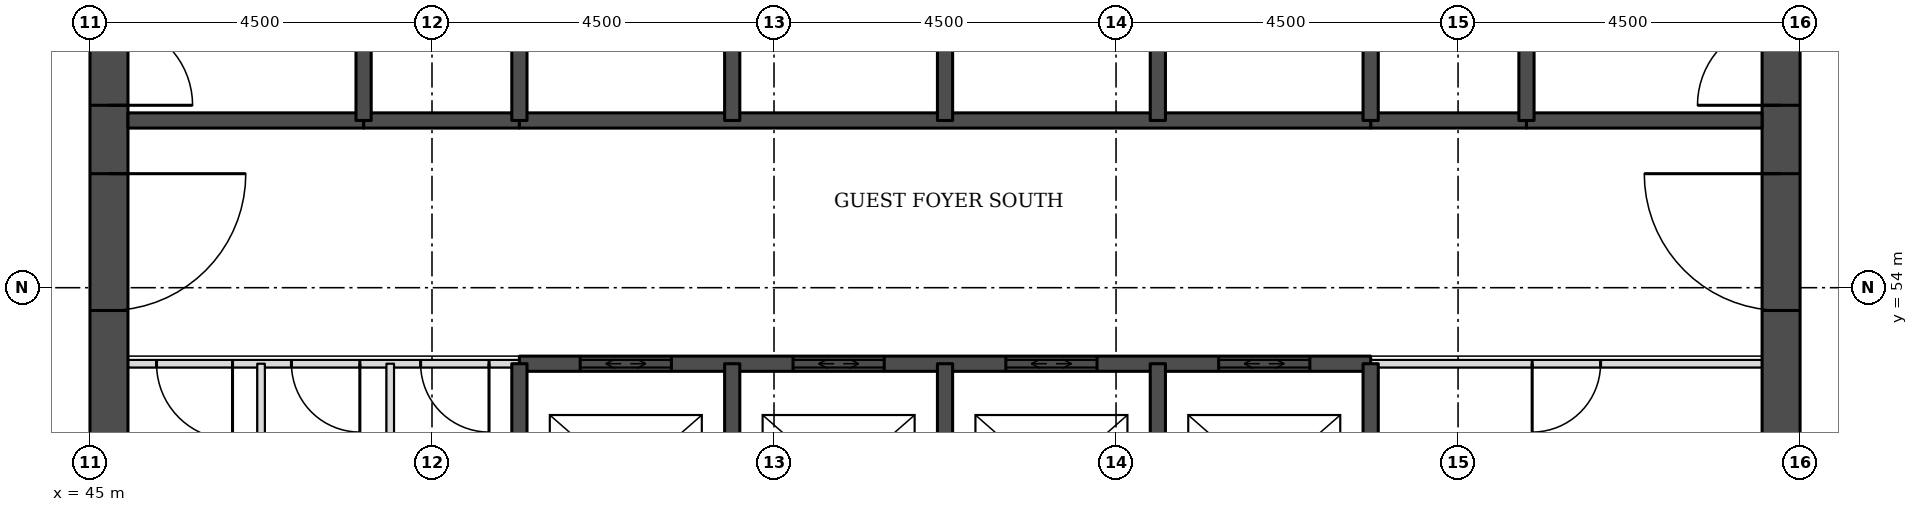
"""IFC4 building model, lengths in metres.
Left out: names, types, materials, properties, quantities, classifications, styles, units other than length and angle.
Written with IfcOpenShell. Run it as: python <this file> out.ifc"""

import sys

from ifc_helpers import new_model, si_unit, direction, frame, frame_2d, origin, place, context, subcontext, project, spatial, rectangle, extrude, element, fill, save


model = new_model("IFC4")
c1 = context("Model", 3, precision=1e-05, world=origin(), true_north=direction((0.0, 1.0)))
c2 = subcontext(c1, "Body", "Model", "MODEL_VIEW")
j1 = project(units=[si_unit("LENGTHUNIT", "METRE"), si_unit("PLANEANGLEUNIT", "RADIAN")], contexts=[c1])
p1 = place(None, origin())
s1 = spatial("IfcSite", under=j1, at=p1, CompositionType="ELEMENT")
p2 = place(p1, origin())
s2 = spatial("IfcBuilding", under=s1, at=p2, CompositionType="ELEMENT")
p3 = place(p2, frame((0.0, 0.0, 39.6)))
s3 = spatial("IfcBuildingStorey", under=s2, at=p3, CompositionType="ELEMENT", Elevation=39.6)
p4 = place(p3, frame((45.25, 49.5, 0.0), z_axis=(0.0, 0.0, 1.0), x_axis=(0.0, 1.0, 0.0)))
e1 = element("IfcWall", 1, at=p4, inside=s3, PredefinedType="SHEAR", context=c2, shape_type="SweptSolid", body=[
    extrude(rectangle(XDim=22.5, YDim=0.5, at=frame_2d((11.25, 0.0))), origin(), (0.0, 0.0, 1.0), 3.3),
])
p5 = place(p4, frame((4.2, 0.0, 0.0)))
e2 = element("IfcOpeningElement", 2, at=p5, cuts=e1, PredefinedType="OPENING", context=c2, shape_type="SweptSolid", body=[
    extrude(rectangle(XDim=1.8, YDim=2.1, at=frame_2d((0.9, 1.05))), frame((0.0, 0.26, 0.0), z_axis=(0.0, -1.0, 0.0), x_axis=(1.0, 0.0, 0.0)), (0.0, 0.0, 1.0), 0.52),
])
p6 = place(p4, frame((6.9, 0.0, 0.0)))
e3 = element("IfcOpeningElement", 3, at=p6, cuts=e1, PredefinedType="OPENING", context=c2, shape_type="SweptSolid", body=[
    extrude(rectangle(XDim=1.1, YDim=2.1, at=frame_2d((0.55, 1.05))), frame((0.0, 0.26, 0.0), z_axis=(0.0, -1.0, 0.0), x_axis=(1.0, 0.0, 0.0)), (0.0, 0.0, 1.0), 0.52),
])
p7 = place(p4, frame((13.6, 0.0, 0.0)))
e4 = element("IfcOpeningElement", 4, at=p7, cuts=e1, PredefinedType="OPENING", context=c2, shape_type="SweptSolid", body=[
    extrude(rectangle(XDim=1.1, YDim=2.1, at=frame_2d((0.55, 1.05))), frame((0.0, 0.26, 0.0), z_axis=(0.0, -1.0, 0.0), x_axis=(1.0, 0.0, 0.0)), (0.0, 0.0, 1.0), 0.52),
])
p8 = place(p4, frame((16.5, 0.0, 0.0)))
e5 = element("IfcOpeningElement", 5, at=p8, cuts=e1, PredefinedType="OPENING", context=c2, shape_type="SweptSolid", body=[
    extrude(rectangle(XDim=1.8, YDim=2.1, at=frame_2d((0.9, 1.05))), frame((0.0, 0.26, 0.0), z_axis=(0.0, -1.0, 0.0), x_axis=(1.0, 0.0, 0.0)), (0.0, 0.0, 1.0), 0.52),
])
p9 = place(p3, frame((67.25, 49.5, 0.0), z_axis=(0.0, 0.0, 1.0), x_axis=(0.0, 1.0, 0.0)))
e6 = element("IfcWall", 6, at=p9, inside=s3, PredefinedType="SHEAR", context=c2, shape_type="SweptSolid", body=[
    extrude(rectangle(XDim=22.5, YDim=0.5, at=frame_2d((11.25, 0.0))), origin(), (0.0, 0.0, 1.0), 3.3),
])
p10 = place(p9, frame((4.2, 0.0, 0.0)))
e7 = element("IfcOpeningElement", 7, at=p10, cuts=e6, PredefinedType="OPENING", context=c2, shape_type="SweptSolid", body=[
    extrude(rectangle(XDim=1.8, YDim=2.1, at=frame_2d((0.9, 1.05))), frame((0.0, 0.26, 0.0), z_axis=(0.0, -1.0, 0.0), x_axis=(1.0, 0.0, 0.0)), (0.0, 0.0, 1.0), 0.52),
])
p11 = place(p9, frame((6.9, 0.0, 0.0)))
e8 = element("IfcOpeningElement", 8, at=p11, cuts=e6, PredefinedType="OPENING", context=c2, shape_type="SweptSolid", body=[
    extrude(rectangle(XDim=1.1, YDim=2.1, at=frame_2d((0.55, 1.05))), frame((0.0, 0.26, 0.0), z_axis=(0.0, -1.0, 0.0), x_axis=(1.0, 0.0, 0.0)), (0.0, 0.0, 1.0), 0.52),
])
p12 = place(p9, frame((13.6, 0.0, 0.0)))
e9 = element("IfcOpeningElement", 9, at=p12, cuts=e6, PredefinedType="OPENING", context=c2, shape_type="SweptSolid", body=[
    extrude(rectangle(XDim=1.1, YDim=2.1, at=frame_2d((0.55, 1.05))), frame((0.0, 0.26, 0.0), z_axis=(0.0, -1.0, 0.0), x_axis=(1.0, 0.0, 0.0)), (0.0, 0.0, 1.0), 0.52),
])
p13 = place(p9, frame((16.5, 0.0, 0.0)))
e10 = element("IfcOpeningElement", 10, at=p13, cuts=e6, PredefinedType="OPENING", context=c2, shape_type="SweptSolid", body=[
    extrude(rectangle(XDim=1.8, YDim=2.1, at=frame_2d((0.9, 1.05))), frame((0.0, 0.26, 0.0), z_axis=(0.0, -1.0, 0.0), x_axis=(1.0, 0.0, 0.0)), (0.0, 0.0, 1.0), 0.52),
])
p14 = place(p3, frame((45.5, 53.0, 0.0), z_axis=(0.0, 0.0, 1.0), x_axis=(1.0, 0.0, 0.0)))
e11 = element("IfcWall", 11, at=p14, inside=s3, PredefinedType="PARTITIONING", context=c2, shape_type="SweptSolid", body=[
    extrude(rectangle(XDim=5.15, YDim=0.1, at=frame_2d((2.575, 0.0))), origin(), (0.0, 0.0, 1.0), 3.08),
])
p15 = place(p14, frame((0.375, 0.0, 0.0)))
e12 = element("IfcOpeningElement", 12, at=p15, cuts=e11, PredefinedType="OPENING", context=c2, shape_type="SweptSolid", body=[
    extrude(rectangle(XDim=1.0, YDim=2.1, at=frame_2d((0.5, 1.05))), frame((0.0, 0.06, 0.0), z_axis=(0.0, -1.0, 0.0), x_axis=(1.0, 0.0, 0.0)), (0.0, 0.0, 1.0), 0.12),
])
p16 = place(p14, frame((2.151, 0.0, 0.0)))
e13 = element("IfcOpeningElement", 13, at=p16, cuts=e11, PredefinedType="OPENING", context=c2, shape_type="SweptSolid", body=[
    extrude(rectangle(XDim=0.9, YDim=2.1, at=frame_2d((0.45, 1.05))), frame((0.0, 0.06, 0.0), z_axis=(0.0, -1.0, 0.0), x_axis=(1.0, 0.0, 0.0)), (0.0, 0.0, 1.0), 0.12),
])
p17 = place(p14, frame((3.85, 0.0, 0.0)))
e14 = element("IfcOpeningElement", 14, at=p17, cuts=e11, PredefinedType="OPENING", context=c2, shape_type="SweptSolid", body=[
    extrude(rectangle(XDim=0.9, YDim=2.1, at=frame_2d((0.45, 1.05))), frame((0.0, 0.06, 0.0), z_axis=(0.0, -1.0, 0.0), x_axis=(1.0, 0.0, 0.0)), (0.0, 0.0, 1.0), 0.12),
])
p18 = place(p3, frame((61.85, 53.0, 0.0), z_axis=(0.0, 0.0, 1.0), x_axis=(1.0, 0.0, 0.0)))
e15 = element("IfcWall", 15, at=p18, inside=s3, PredefinedType="PARTITIONING", context=c2, shape_type="SweptSolid", body=[
    extrude(rectangle(XDim=5.15, YDim=0.1, at=frame_2d((2.575, 0.0))), origin(), (0.0, 0.0, 1.0), 3.08),
])
p19 = place(p18, frame((2.125, 0.0, 0.0)))
e16 = element("IfcOpeningElement", 16, at=p19, cuts=e15, PredefinedType="OPENING", context=c2, shape_type="SweptSolid", body=[
    extrude(rectangle(XDim=0.9, YDim=2.1, at=frame_2d((0.45, 1.05))), frame((0.0, 0.06, 0.0), z_axis=(0.0, -1.0, 0.0), x_axis=(1.0, 0.0, 0.0)), (0.0, 0.0, 1.0), 0.12),
])
p20 = place(p3, frame((50.65, 53.0, 0.0), z_axis=(0.0, 0.0, 1.0), x_axis=(1.0, 0.0, 0.0)))
e17 = element("IfcWall", 17, at=p20, inside=s3, PredefinedType="SOLIDWALL", context=c2, shape_type="SweptSolid", body=[
    extrude(rectangle(XDim=11.2, YDim=0.2, at=frame_2d((5.6, 0.0))), origin(), (0.0, 0.0, 1.0), 3.08),
])
p21 = place(p20, frame((0.8, 0.0, 0.0)))
e18 = element("IfcOpeningElement", 18, at=p21, cuts=e17, PredefinedType="OPENING", context=c2, shape_type="SweptSolid", body=[
    extrude(rectangle(XDim=1.2, YDim=2.1, at=frame_2d((0.6, 1.05))), frame((0.0, 0.11, 0.0), z_axis=(0.0, -1.0, 0.0), x_axis=(1.0, 0.0, 0.0)), (0.0, 0.0, 1.0), 0.22),
])
p22 = place(p20, frame((3.6, 0.0, 0.0)))
e19 = element("IfcOpeningElement", 19, at=p22, cuts=e17, PredefinedType="OPENING", context=c2, shape_type="SweptSolid", body=[
    extrude(rectangle(XDim=1.2, YDim=2.1, at=frame_2d((0.6, 1.05))), frame((0.0, 0.11, 0.0), z_axis=(0.0, -1.0, 0.0), x_axis=(1.0, 0.0, 0.0)), (0.0, 0.0, 1.0), 0.22),
])
p23 = place(p20, frame((6.4, 0.0, 0.0)))
e20 = element("IfcOpeningElement", 20, at=p23, cuts=e17, PredefinedType="OPENING", context=c2, shape_type="SweptSolid", body=[
    extrude(rectangle(XDim=1.2, YDim=2.1, at=frame_2d((0.6, 1.05))), frame((0.0, 0.11, 0.0), z_axis=(0.0, -1.0, 0.0), x_axis=(1.0, 0.0, 0.0)), (0.0, 0.0, 1.0), 0.22),
])
p24 = place(p20, frame((9.2, 0.0, 0.0)))
e21 = element("IfcOpeningElement", 21, at=p24, cuts=e17, PredefinedType="OPENING", context=c2, shape_type="SweptSolid", body=[
    extrude(rectangle(XDim=1.2, YDim=2.1, at=frame_2d((0.6, 1.05))), frame((0.0, 0.11, 0.0), z_axis=(0.0, -1.0, 0.0), x_axis=(1.0, 0.0, 0.0)), (0.0, 0.0, 1.0), 0.22),
])
for number, where, z_axis, x_axis in (
    (22, (48.6, 56.2, 0.0), (0.0, 0.0, 1.0), (1.0, 0.0, 0.0)),
    (23, (61.85, 56.2, 0.0), (0.0, 0.0, 1.0), (1.0, 0.0, 0.0)),
):
    element("IfcWall", number, at=place(p3, frame(where, z_axis=z_axis, x_axis=x_axis)), inside=s3, PredefinedType="SOLIDWALL", context=c2, shape_type="SweptSolid", body=[
        extrude(rectangle(XDim=2.05, YDim=0.2, at=frame_2d((1.025, 0.0))), origin(), (0.0, 0.0, 1.0), 3.08),
    ])
p25 = place(p3, frame((45.5, 56.2, 0.0), z_axis=(0.0, 0.0, 1.0), x_axis=(1.0, 0.0, 0.0)))
e24 = element("IfcWall", 24, at=p25, inside=s3, PredefinedType="SOLIDWALL", context=c2, shape_type="SweptSolid", body=[
    extrude(rectangle(XDim=3.1, YDim=0.2, at=frame_2d((1.55, 0.0))), origin(), (0.0, 0.0, 1.0), 3.08),
])
p26 = place(p3, frame((50.65, 56.2, 0.0), z_axis=(0.0, 0.0, 1.0), x_axis=(1.0, 0.0, 0.0)))
e25 = element("IfcWall", 25, at=p26, inside=s3, PredefinedType="SOLIDWALL", context=c2, shape_type="SweptSolid", body=[
    extrude(rectangle(XDim=11.2, YDim=0.2, at=frame_2d((5.6, 0.0))), origin(), (0.0, 0.0, 1.0), 3.08),
])
p27 = place(p3, frame((63.9, 56.2, 0.0), z_axis=(0.0, 0.0, 1.0), x_axis=(1.0, 0.0, 0.0)))
e26 = element("IfcWall", 26, at=p27, inside=s3, PredefinedType="SOLIDWALL", context=c2, shape_type="SweptSolid", body=[
    extrude(rectangle(XDim=3.1, YDim=0.2, at=frame_2d((1.55, 0.0))), origin(), (0.0, 0.0, 1.0), 3.08),
])
p28 = place(p3, frame((47.251, 50.0, 0.0), z_axis=(0.0, 0.0, 1.0), x_axis=(0.0, 1.0, 0.0)))
e27 = element("IfcWall", 27, at=p28, inside=s3, PredefinedType="PARTITIONING", context=c2, shape_type="SweptSolid", body=[
    extrude(rectangle(XDim=3.0, YDim=0.1, at=frame_2d((1.5, 0.0))), origin(), (0.0, 0.0, 1.0), 3.08),
])
p29 = place(p3, frame((48.6, 56.2, 0.0), z_axis=(0.0, 0.0, 1.0), x_axis=(0.0, 1.0, 0.0)))
e28 = element("IfcWall", 28, at=p29, inside=s3, PredefinedType="SOLIDWALL", context=c2, shape_type="SweptSolid", body=[
    extrude(rectangle(XDim=5.8, YDim=0.2, at=frame_2d((2.9, 0.0))), origin(), (0.0, 0.0, 1.0), 3.08),
])
p30 = place(p3, frame((48.95, 50.0, 0.0), z_axis=(0.0, 0.0, 1.0), x_axis=(0.0, 1.0, 0.0)))
e29 = element("IfcWall", 29, at=p30, inside=s3, PredefinedType="PARTITIONING", context=c2, shape_type="SweptSolid", body=[
    extrude(rectangle(XDim=3.0, YDim=0.1, at=frame_2d((1.5, 0.0))), origin(), (0.0, 0.0, 1.0), 3.08),
])
p31 = place(p3, frame((50.65, 50.0, 0.0), z_axis=(0.0, 0.0, 1.0), x_axis=(0.0, 1.0, 0.0)))
e30 = element("IfcWall", 30, at=p31, inside=s3, PredefinedType="SOLIDWALL", context=c2, shape_type="SweptSolid", body=[
    extrude(rectangle(XDim=3.0, YDim=0.2, at=frame_2d((1.5, 0.0))), origin(), (0.0, 0.0, 1.0), 3.08),
])
p32 = place(p3, frame((50.65, 56.2, 0.0), z_axis=(0.0, 0.0, 1.0), x_axis=(0.0, 1.0, 0.0)))
e31 = element("IfcWall", 31, at=p32, inside=s3, PredefinedType="SOLIDWALL", context=c2, shape_type="SweptSolid", body=[
    extrude(rectangle(XDim=2.8, YDim=0.2, at=frame_2d((1.4, 0.0))), origin(), (0.0, 0.0, 1.0), 3.08),
])
p33 = place(p3, frame((53.45, 50.0, 0.0), z_axis=(0.0, 0.0, 1.0), x_axis=(0.0, 1.0, 0.0)))
e32 = element("IfcWall", 32, at=p33, inside=s3, PredefinedType="SOLIDWALL", context=c2, shape_type="SweptSolid", body=[
    extrude(rectangle(XDim=3.0, YDim=0.2, at=frame_2d((1.5, 0.0))), origin(), (0.0, 0.0, 1.0), 3.08),
])
p34 = place(p3, frame((53.45, 56.2, 0.0), z_axis=(0.0, 0.0, 1.0), x_axis=(0.0, 1.0, 0.0)))
e33 = element("IfcWall", 33, at=p34, inside=s3, PredefinedType="SOLIDWALL", context=c2, shape_type="SweptSolid", body=[
    extrude(rectangle(XDim=2.8, YDim=0.2, at=frame_2d((1.4, 0.0))), origin(), (0.0, 0.0, 1.0), 3.08),
])
p35 = place(p3, frame((56.25, 50.0, 0.0), z_axis=(0.0, 0.0, 1.0), x_axis=(0.0, 1.0, 0.0)))
e34 = element("IfcWall", 34, at=p35, inside=s3, PredefinedType="SOLIDWALL", context=c2, shape_type="SweptSolid", body=[
    extrude(rectangle(XDim=3.0, YDim=0.2, at=frame_2d((1.5, 0.0))), origin(), (0.0, 0.0, 1.0), 3.08),
])
p36 = place(p3, frame((56.25, 56.2, 0.0), z_axis=(0.0, 0.0, 1.0), x_axis=(0.0, 1.0, 0.0)))
e35 = element("IfcWall", 35, at=p36, inside=s3, PredefinedType="SOLIDWALL", context=c2, shape_type="SweptSolid", body=[
    extrude(rectangle(XDim=2.8, YDim=0.2, at=frame_2d((1.4, 0.0))), origin(), (0.0, 0.0, 1.0), 3.08),
])
p37 = place(p3, frame((59.05, 50.0, 0.0), z_axis=(0.0, 0.0, 1.0), x_axis=(0.0, 1.0, 0.0)))
e36 = element("IfcWall", 36, at=p37, inside=s3, PredefinedType="SOLIDWALL", context=c2, shape_type="SweptSolid", body=[
    extrude(rectangle(XDim=3.0, YDim=0.2, at=frame_2d((1.5, 0.0))), origin(), (0.0, 0.0, 1.0), 3.08),
])
p38 = place(p3, frame((59.05, 56.2, 0.0), z_axis=(0.0, 0.0, 1.0), x_axis=(0.0, 1.0, 0.0)))
e37 = element("IfcWall", 37, at=p38, inside=s3, PredefinedType="SOLIDWALL", context=c2, shape_type="SweptSolid", body=[
    extrude(rectangle(XDim=2.8, YDim=0.2, at=frame_2d((1.4, 0.0))), origin(), (0.0, 0.0, 1.0), 3.08),
])
p39 = place(p3, frame((61.85, 50.0, 0.0), z_axis=(0.0, 0.0, 1.0), x_axis=(0.0, 1.0, 0.0)))
e38 = element("IfcWall", 38, at=p39, inside=s3, PredefinedType="SOLIDWALL", context=c2, shape_type="SweptSolid", body=[
    extrude(rectangle(XDim=3.0, YDim=0.2, at=frame_2d((1.5, 0.0))), origin(), (0.0, 0.0, 1.0), 3.08),
])
p40 = place(p3, frame((61.85, 56.2, 0.0), z_axis=(0.0, 0.0, 1.0), x_axis=(0.0, 1.0, 0.0)))
e39 = element("IfcWall", 39, at=p40, inside=s3, PredefinedType="SOLIDWALL", context=c2, shape_type="SweptSolid", body=[
    extrude(rectangle(XDim=2.8, YDim=0.2, at=frame_2d((1.4, 0.0))), origin(), (0.0, 0.0, 1.0), 3.08),
])
p41 = place(p3, frame((63.9, 56.2, 0.0), z_axis=(0.0, 0.0, 1.0), x_axis=(0.0, 1.0, 0.0)))
e40 = element("IfcWall", 40, at=p41, inside=s3, PredefinedType="SOLIDWALL", context=c2, shape_type="SweptSolid", body=[
    extrude(rectangle(XDim=5.8, YDim=0.2, at=frame_2d((2.9, 0.0))), origin(), (0.0, 0.0, 1.0), 3.08),
])
p42 = place(p21, origin())
e41 = element("IfcDoor", 41, at=p42, inside=s3, OperationType="DOUBLE_DOOR_SLIDING", PredefinedType="DOOR", context=c2, shape_type="SweptSolid", body=[
    extrude(rectangle(XDim=1.2, YDim=2.1, at=frame_2d((0.6, 1.05))), frame((0.0, 0.025, 0.0), z_axis=(0.0, -1.0, 0.0), x_axis=(1.0, 0.0, 0.0)), (0.0, 0.0, 1.0), 0.05),
])
fill(e18, e41)
p43 = place(p22, origin())
e42 = element("IfcDoor", 42, at=p43, inside=s3, OperationType="DOUBLE_DOOR_SLIDING", PredefinedType="DOOR", context=c2, shape_type="SweptSolid", body=[
    extrude(rectangle(XDim=1.2, YDim=2.1, at=frame_2d((0.6, 1.05))), frame((0.0, 0.025, 0.0), z_axis=(0.0, -1.0, 0.0), x_axis=(1.0, 0.0, 0.0)), (0.0, 0.0, 1.0), 0.05),
])
fill(e19, e42)
p44 = place(p23, origin())
e43 = element("IfcDoor", 43, at=p44, inside=s3, OperationType="DOUBLE_DOOR_SLIDING", PredefinedType="DOOR", context=c2, shape_type="SweptSolid", body=[
    extrude(rectangle(XDim=1.2, YDim=2.1, at=frame_2d((0.6, 1.05))), frame((0.0, 0.025, 0.0), z_axis=(0.0, -1.0, 0.0), x_axis=(1.0, 0.0, 0.0)), (0.0, 0.0, 1.0), 0.05),
])
fill(e20, e43)
p45 = place(p24, origin())
e44 = element("IfcDoor", 44, at=p45, inside=s3, OperationType="DOUBLE_DOOR_SLIDING", PredefinedType="DOOR", context=c2, shape_type="SweptSolid", body=[
    extrude(rectangle(XDim=1.2, YDim=2.1, at=frame_2d((0.6, 1.05))), frame((0.0, 0.025, 0.0), z_axis=(0.0, -1.0, 0.0), x_axis=(1.0, 0.0, 0.0)), (0.0, 0.0, 1.0), 0.05),
])
fill(e21, e44)
p46 = place(p5, frame((1.8, 0.0, 0.0), z_axis=(0.0, 0.0, 1.0), x_axis=(-1.0, 0.0, 0.0)))
e45 = element("IfcDoor", 45, at=p46, inside=s3, OperationType="SINGLE_SWING_LEFT", PredefinedType="DOOR", context=c2, shape_type="SweptSolid", body=[
    extrude(rectangle(XDim=1.8, YDim=2.1, at=frame_2d((0.9, 1.05))), frame((0.0, 0.025, 0.0), z_axis=(0.0, -1.0, 0.0), x_axis=(1.0, 0.0, 0.0)), (0.0, 0.0, 1.0), 0.05),
])
fill(e2, e45)
p47 = place(p6, frame((1.1, 0.0, 0.0), z_axis=(0.0, 0.0, 1.0), x_axis=(-1.0, 0.0, 0.0)))
e46 = element("IfcDoor", 46, at=p47, inside=s3, OperationType="SINGLE_SWING_RIGHT", PredefinedType="DOOR", context=c2, shape_type="SweptSolid", body=[
    extrude(rectangle(XDim=1.1, YDim=2.1, at=frame_2d((0.55, 1.05))), frame((0.0, 0.025, 0.0), z_axis=(0.0, -1.0, 0.0), x_axis=(1.0, 0.0, 0.0)), (0.0, 0.0, 1.0), 0.05),
])
fill(e3, e46)
p48 = place(p10, origin())
e47 = element("IfcDoor", 47, at=p48, inside=s3, OperationType="SINGLE_SWING_RIGHT", PredefinedType="DOOR", context=c2, shape_type="SweptSolid", body=[
    extrude(rectangle(XDim=1.8, YDim=2.1, at=frame_2d((0.9, 1.05))), frame((0.0, 0.025, 0.0), z_axis=(0.0, -1.0, 0.0), x_axis=(1.0, 0.0, 0.0)), (0.0, 0.0, 1.0), 0.05),
])
fill(e7, e47)
p49 = place(p11, origin())
e48 = element("IfcDoor", 48, at=p49, inside=s3, OperationType="SINGLE_SWING_LEFT", PredefinedType="DOOR", context=c2, shape_type="SweptSolid", body=[
    extrude(rectangle(XDim=1.1, YDim=2.1, at=frame_2d((0.55, 1.05))), frame((0.0, 0.025, 0.0), z_axis=(0.0, -1.0, 0.0), x_axis=(1.0, 0.0, 0.0)), (0.0, 0.0, 1.0), 0.05),
])
fill(e8, e48)
p50 = place(p19, frame((0.9, 0.0, 0.0), z_axis=(0.0, 0.0, 1.0), x_axis=(-1.0, 0.0, 0.0)))
e49 = element("IfcDoor", 49, at=p50, inside=s3, OperationType="SINGLE_SWING_RIGHT", PredefinedType="DOOR", context=c2, shape_type="SweptSolid", body=[
    extrude(rectangle(XDim=0.9, YDim=2.1, at=frame_2d((0.45, 1.05))), frame((0.0, 0.025, 0.0), z_axis=(0.0, -1.0, 0.0), x_axis=(1.0, 0.0, 0.0)), (0.0, 0.0, 1.0), 0.05),
])
fill(e16, e49)
p51 = place(p15, frame((1.0, 0.0, 0.0), z_axis=(0.0, 0.0, 1.0), x_axis=(-1.0, 0.0, 0.0)))
e50 = element("IfcDoor", 50, at=p51, inside=s3, OperationType="SINGLE_SWING_LEFT", PredefinedType="DOOR", context=c2, shape_type="SweptSolid", body=[
    extrude(rectangle(XDim=1.0, YDim=2.1, at=frame_2d((0.5, 1.05))), frame((0.0, 0.025, 0.0), z_axis=(0.0, -1.0, 0.0), x_axis=(1.0, 0.0, 0.0)), (0.0, 0.0, 1.0), 0.05),
])
fill(e12, e50)
p52 = place(p16, frame((0.9, 0.0, 0.0), z_axis=(0.0, 0.0, 1.0), x_axis=(-1.0, 0.0, 0.0)))
e51 = element("IfcDoor", 51, at=p52, inside=s3, OperationType="SINGLE_SWING_LEFT", PredefinedType="DOOR", context=c2, shape_type="SweptSolid", body=[
    extrude(rectangle(XDim=0.9, YDim=2.1, at=frame_2d((0.45, 1.05))), frame((0.0, 0.025, 0.0), z_axis=(0.0, -1.0, 0.0), x_axis=(1.0, 0.0, 0.0)), (0.0, 0.0, 1.0), 0.05),
])
fill(e13, e51)
p53 = place(p17, frame((0.9, 0.0, 0.0), z_axis=(0.0, 0.0, 1.0), x_axis=(-1.0, 0.0, 0.0)))
e52 = element("IfcDoor", 52, at=p53, inside=s3, OperationType="SINGLE_SWING_LEFT", PredefinedType="DOOR", context=c2, shape_type="SweptSolid", body=[
    extrude(rectangle(XDim=0.9, YDim=2.1, at=frame_2d((0.45, 1.05))), frame((0.0, 0.025, 0.0), z_axis=(0.0, -1.0, 0.0), x_axis=(1.0, 0.0, 0.0)), (0.0, 0.0, 1.0), 0.05),
])
fill(e14, e52)
save(model, sys.argv[1])
